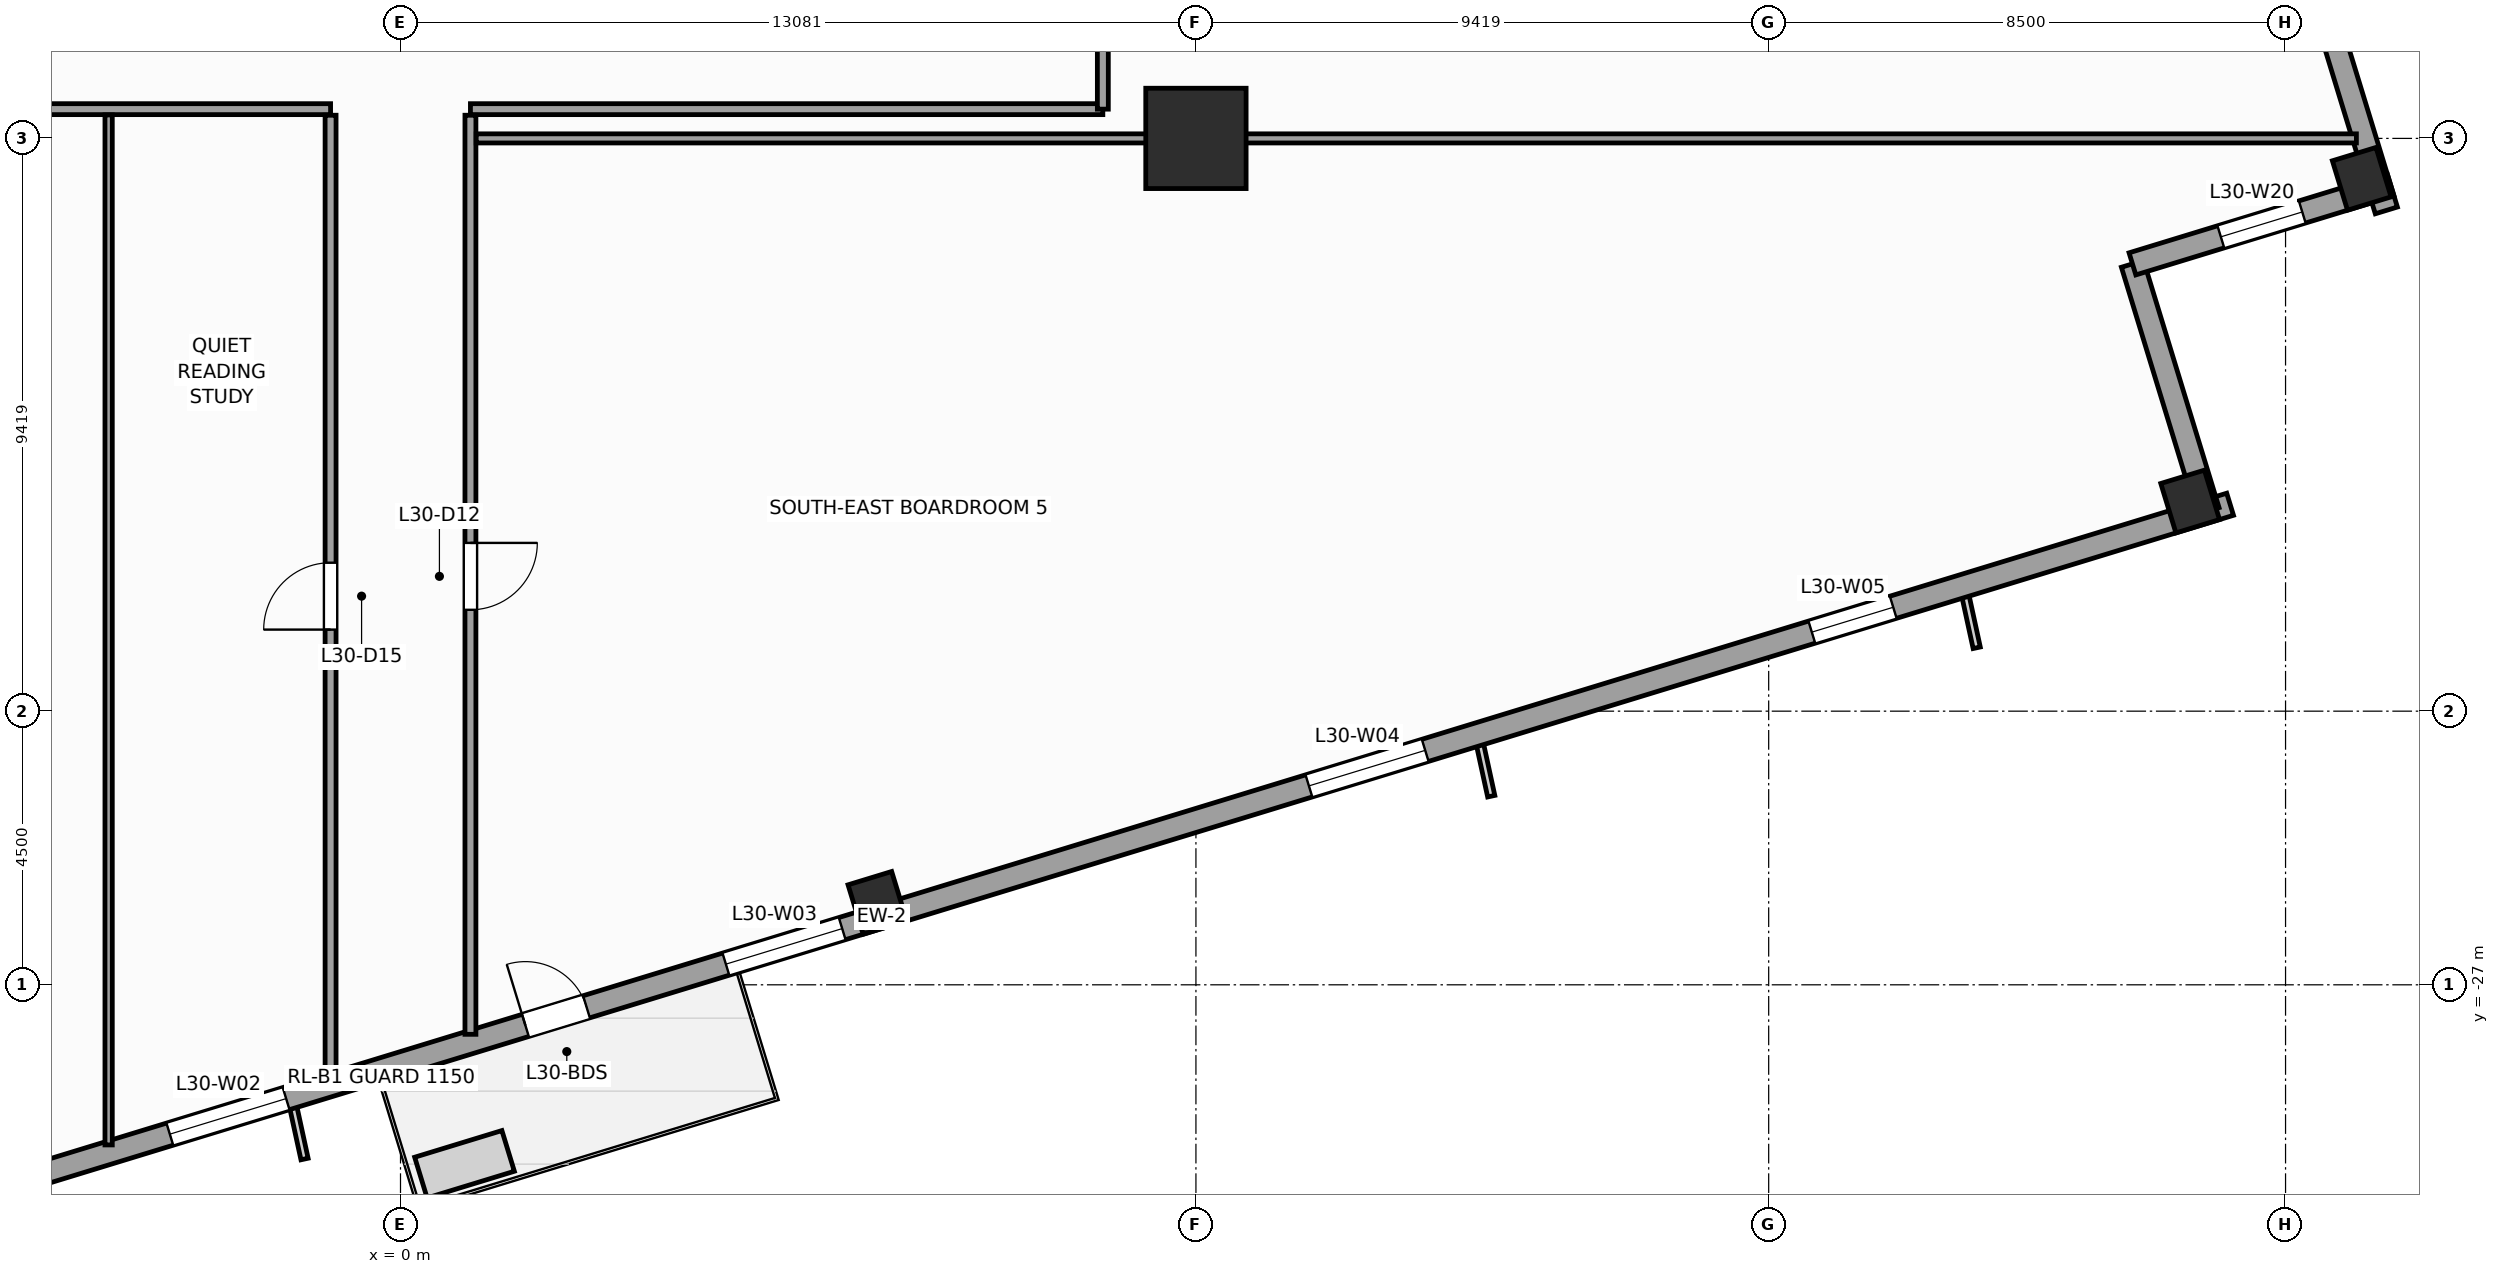
"""IFC4 building model, lengths in metres.
Left out: names, types, materials, properties, quantities, classifications, styles, units other than length and angle.
Written with IfcOpenShell. Run it as: python <this file> out.ifc"""

import sys

from ifc_helpers import new_model, si_unit, direction, frame, frame_2d, origin, origin_2d, place, context, subcontext, project, spatial, rectangle, extrude, source, transform, mapped, element, fill, save


model = new_model("IFC4")
c1 = context("Model", 3, precision=1e-05, world=origin(), true_north=direction((0.0, 1.0)))
c2 = subcontext(c1, "Body", "Model", "MODEL_VIEW")
j1 = project(units=[si_unit("LENGTHUNIT", "METRE"), si_unit("PLANEANGLEUNIT", "RADIAN")], contexts=[c1])
p1 = place(None, origin())
s1 = spatial("IfcSite", under=j1, at=p1, CompositionType="ELEMENT")
p2 = place(p1, origin())
s2 = spatial("IfcBuilding", under=s1, at=p2, CompositionType="ELEMENT")
p3 = place(p2, frame((0.0, 0.0, 127.2)))
s3 = spatial("IfcBuildingStorey", under=s2, at=p3, CompositionType="ELEMENT", Elevation=127.2)
m1 = source(origin(), c2, "Body", "SweptSolid", [
    extrude(rectangle(XDim=1.65, YDim=1.65, at=origin_2d()), origin(), (0.0, 0.0, 1.0), 4.0),
])
p4 = place(p3, frame((13.081, -13.081, 0.0), z_axis=(0.0, 0.0, 1.0), x_axis=(1.0, 0.0, 0.0)))
e1 = element("IfcColumn", 1, at=p4, inside=s3, PredefinedType="COLUMN", context=c2, shape_type="MappedRepresentation", body=[
    mapped(m1, transform((0.0, 0.0, 0.0), scale=1.0)),
])
m2 = source(origin(), c2, "Body", "SweptSolid", [
    extrude(rectangle(XDim=0.75, YDim=0.85, at=origin_2d()), origin(), (0.0, 0.0, 1.0), 4.0),
])
for number, where, z_axis, x_axis in (
    (2, (7.843, -25.653, 0.0), (0.0, 0.0, 1.0), (0.956, 0.292, 0.0)),
    (3, (29.431, -19.052, 0.0), (0.0, 0.0, 1.0), (0.956, 0.292, 0.0)),
    (4, (32.253, -13.746, 0.0), (0.0, 0.0, 1.0), (0.956, 0.292, 0.0)),
):
    element("IfcColumn", number, at=place(p3, frame(where, z_axis=z_axis, x_axis=x_axis)), inside=s3, PredefinedType="COLUMN", context=c2, shape_type="MappedRepresentation", body=[
        mapped(m2, transform((0.0, 0.0, 0.0), scale=1.0)),
    ])
p5 = place(p3, frame((-14.265, -32.658, 0.0), z_axis=(0.0, 0.0, 1.0), x_axis=(0.956304320851, 0.292373127906, 0.0)))
e5 = element("IfcWall", 5, at=p5, inside=s3, PredefinedType="STANDARD", context=c2, shape_type="SweptSolid", body=[
    extrude(rectangle(XDim=46.38, YDim=0.38, at=frame_2d((23.19, 0.0))), origin(), (0.0, 0.0, 1.0), 3.14),
])
p6 = place(p5, frame((17.065, 0.0, 0.0)))
e6 = element("IfcOpeningElement", 6, at=p6, cuts=e5, PredefinedType="OPENING", context=c2, shape_type="SweptSolid", body=[
    extrude(rectangle(XDim=1.05, YDim=2.25, at=frame_2d((0.525, 1.125))), frame((0.0, 0.2, 0.0), z_axis=(0.0, -1.0, 0.0), x_axis=(1.0, 0.0, 0.0)), (0.0, 0.0, 1.0), 0.4),
])
p7 = place(p5, frame((4.865, 0.0, 0.51)))
e7 = element("IfcOpeningElement", 7, at=p7, cuts=e5, PredefinedType="OPENING", context=c2, shape_type="SweptSolid", body=[
    extrude(rectangle(XDim=1.4, YDim=2.4, at=frame_2d((0.7, 1.2))), frame((0.0, 0.2, 0.0), z_axis=(0.0, -1.0, 0.0), x_axis=(1.0, 0.0, 0.0)), (0.0, 0.0, 1.0), 0.4),
])
p8 = place(p5, frame((10.95, 0.0, 0.51)))
e8 = element("IfcOpeningElement", 8, at=p8, cuts=e5, PredefinedType="OPENING", context=c2, shape_type="SweptSolid", body=[
    extrude(rectangle(XDim=2.0, YDim=2.4, at=frame_2d((1.0, 1.2))), frame((0.0, 0.2, 0.0), z_axis=(0.0, -1.0, 0.0), x_axis=(1.0, 0.0, 0.0)), (0.0, 0.0, 1.0), 0.4),
])
p9 = place(p5, frame((20.512, 0.0, 0.51)))
e9 = element("IfcOpeningElement", 9, at=p9, cuts=e5, PredefinedType="OPENING", context=c2, shape_type="SweptSolid", body=[
    extrude(rectangle(XDim=2.0, YDim=2.4, at=frame_2d((1.0, 1.2))), frame((0.0, 0.2, 0.0), z_axis=(0.0, -1.0, 0.0), x_axis=(1.0, 0.0, 0.0)), (0.0, 0.0, 1.0), 0.4),
])
p10 = place(p5, frame((30.538, 0.0, 0.51)))
e10 = element("IfcOpeningElement", 10, at=p10, cuts=e5, PredefinedType="OPENING", context=c2, shape_type="SweptSolid", body=[
    extrude(rectangle(XDim=2.0, YDim=2.4, at=frame_2d((1.0, 1.2))), frame((0.0, 0.2, 0.0), z_axis=(0.0, -1.0, 0.0), x_axis=(1.0, 0.0, 0.0)), (0.0, 0.0, 1.0), 0.4),
])
p11 = place(p5, frame((39.187, 0.0, 0.51)))
e11 = element("IfcOpeningElement", 11, at=p11, cuts=e5, PredefinedType="OPENING", context=c2, shape_type="SweptSolid", body=[
    extrude(rectangle(XDim=1.4, YDim=2.4, at=frame_2d((0.7, 1.2))), frame((0.0, 0.2, 0.0), z_axis=(0.0, -1.0, 0.0), x_axis=(1.0, 0.0, 0.0)), (0.0, 0.0, 1.0), 0.4),
])
p12 = place(p3, frame((29.725, -19.208, 0.0), z_axis=(0.0, 0.0, 1.0), x_axis=(-0.292345507338, 0.956312764915, 0.0)))
e12 = element("IfcWall", 12, at=p12, inside=s3, PredefinedType="STANDARD", context=c2, shape_type="SweptSolid", body=[
    extrude(rectangle(XDim=4.25, YDim=0.38, at=frame_2d((2.125, 0.0))), origin(), (0.0, 0.0, 1.0), 3.74),
])
p13 = place(p3, frame((28.482, -15.144, 0.0), z_axis=(0.0, 0.0, 1.0), x_axis=(0.956304176051, 0.292373601522, 0.0)))
e13 = element("IfcWall", 13, at=p13, inside=s3, PredefinedType="STANDARD", context=c2, shape_type="SweptSolid", body=[
    extrude(rectangle(XDim=4.44, YDim=0.38, at=frame_2d((2.22, 0.0))), origin(), (0.0, 0.0, 1.0), 3.04),
])
p14 = place(p13, frame((1.52, 0.0, 0.51)))
e14 = element("IfcOpeningElement", 14, at=p14, cuts=e13, PredefinedType="OPENING", context=c2, shape_type="SweptSolid", body=[
    extrude(rectangle(XDim=1.4, YDim=2.4, at=frame_2d((0.7, 1.2))), frame((0.0, 0.2, 0.0), z_axis=(0.0, -1.0, 0.0), x_axis=(1.0, 0.0, 0.0)), (0.0, 0.0, 1.0), 0.4),
])
p15 = place(p3, frame((32.658, -14.265, 0.0), z_axis=(0.0, 0.0, 1.0), x_axis=(-0.292373127906, 0.956304320851, 0.0)))
e15 = element("IfcWall", 15, at=p15, inside=s3, PredefinedType="STANDARD", context=c2, shape_type="SweptSolid", body=[
    extrude(rectangle(XDim=46.38, YDim=0.38, at=frame_2d((23.19, 0.0))), origin(), (0.0, 0.0, 1.0), 3.14),
])
p16 = place(p15, frame((4.865, 0.0, 0.51)))
e16 = element("IfcOpeningElement", 16, at=p16, cuts=e15, PredefinedType="OPENING", context=c2, shape_type="SweptSolid", body=[
    extrude(rectangle(XDim=1.4, YDim=2.4, at=frame_2d((0.7, 1.2))), frame((0.0, 0.2, 0.0), z_axis=(0.0, -1.0, 0.0), x_axis=(1.0, 0.0, 0.0)), (0.0, 0.0, 1.0), 0.4),
])
p17 = place(p15, frame((12.45, 0.0, 0.51)))
e17 = element("IfcOpeningElement", 17, at=p17, cuts=e15, PredefinedType="OPENING", context=c2, shape_type="SweptSolid", body=[
    extrude(rectangle(XDim=2.0, YDim=2.4, at=frame_2d((1.0, 1.2))), frame((0.0, 0.2, 0.0), z_axis=(0.0, -1.0, 0.0), x_axis=(1.0, 0.0, 0.0)), (0.0, 0.0, 1.0), 0.4),
])
p18 = place(p15, frame((30.538, 0.0, 0.51)))
e18 = element("IfcOpeningElement", 18, at=p18, cuts=e15, PredefinedType="OPENING", context=c2, shape_type="SweptSolid", body=[
    extrude(rectangle(XDim=2.0, YDim=2.4, at=frame_2d((1.0, 1.2))), frame((0.0, 0.2, 0.0), z_axis=(0.0, -1.0, 0.0), x_axis=(1.0, 0.0, 0.0)), (0.0, 0.0, 1.0), 0.4),
])
p19 = place(p15, frame((39.187, 0.0, 0.51)))
e19 = element("IfcOpeningElement", 19, at=p19, cuts=e15, PredefinedType="OPENING", context=c2, shape_type="SweptSolid", body=[
    extrude(rectangle(XDim=1.4, YDim=2.4, at=frame_2d((0.7, 1.2))), frame((0.0, 0.2, 0.0), z_axis=(0.0, -1.0, 0.0), x_axis=(1.0, 0.0, 0.0)), (0.0, 0.0, 1.0), 0.4),
])
p20 = place(p3, frame((-10.45, -12.6, 0.0), z_axis=(0.0, 0.0, 1.0), x_axis=(1.0, 0.0, 0.0)))
e20 = element("IfcWall", 20, at=p20, inside=s3, PredefinedType="PARTITIONING", context=c2, shape_type="SweptSolid", body=[
    extrude(rectangle(XDim=9.3, YDim=0.18, at=frame_2d((4.65, 0.0))), origin(), (0.0, 0.0, 1.0), 3.74),
])
p21 = place(p3, frame((1.15, -12.6, 0.0), z_axis=(0.0, 0.0, 1.0), x_axis=(1.0, 0.0, 0.0)))
e21 = element("IfcWall", 21, at=p21, inside=s3, PredefinedType="PARTITIONING", context=c2, shape_type="SweptSolid", body=[
    extrude(rectangle(XDim=10.4, YDim=0.18, at=frame_2d((5.2, 0.0))), origin(), (0.0, 0.0, 1.0), 3.74),
])
p22 = place(p3, frame((11.55, -12.6, 0.0), z_axis=(0.0, 0.0, 1.0), x_axis=(0.0, 1.0, 0.0)))
e22 = element("IfcWall", 22, at=p22, inside=s3, PredefinedType="PARTITIONING", context=c2, shape_type="SweptSolid", body=[
    extrude(rectangle(XDim=13.65, YDim=0.18, at=frame_2d((6.825, 0.0))), origin(), (0.0, 0.0, 1.0), 3.74),
])
p23 = place(p22, frame((2.714, 0.0, 0.0)))
e23 = element("IfcOpeningElement", 23, at=p23, cuts=e22, PredefinedType="OPENING", context=c2, shape_type="SweptSolid", body=[
    extrude(rectangle(XDim=1.1, YDim=2.2, at=frame_2d((0.55, 1.1))), frame((0.0, 0.1, 0.0), z_axis=(0.0, -1.0, 0.0), x_axis=(1.0, 0.0, 0.0)), (0.0, 0.0, 1.0), 0.2),
])
p24 = place(p3, frame((-1.15, -28.517, 0.0), z_axis=(0.0, 0.0, 1.0), x_axis=(0.0, 1.0, 0.0)))
e24 = element("IfcWall", 24, at=p24, inside=s3, PredefinedType="PARTITIONING", context=c2, shape_type="SweptSolid", body=[
    extrude(rectangle(XDim=15.817, YDim=0.18, at=frame_2d((7.909, 0.0))), origin(), (0.0, 0.0, 1.0), 3.74),
])
p25 = place(p24, frame((7.359, 0.0, 0.0)))
e25 = element("IfcOpeningElement", 25, at=p25, cuts=e24, PredefinedType="OPENING", context=c2, shape_type="SweptSolid", body=[
    extrude(rectangle(XDim=1.1, YDim=2.2, at=frame_2d((0.55, 1.1))), frame((0.0, 0.1, 0.0), z_axis=(0.0, -1.0, 0.0), x_axis=(1.0, 0.0, 0.0)), (0.0, 0.0, 1.0), 0.2),
])
p26 = place(p3, frame((1.15, -27.814, 0.0), z_axis=(0.0, 0.0, 1.0), x_axis=(0.0, 1.0, 0.0)))
e26 = element("IfcWall", 26, at=p26, inside=s3, PredefinedType="PARTITIONING", context=c2, shape_type="SweptSolid", body=[
    extrude(rectangle(XDim=15.114, YDim=0.18, at=frame_2d((7.557, 0.0))), origin(), (0.0, 0.0, 1.0), 3.74),
])
p27 = place(p26, frame((6.981, 0.0, 0.0)))
e27 = element("IfcOpeningElement", 27, at=p27, cuts=e26, PredefinedType="OPENING", context=c2, shape_type="SweptSolid", body=[
    extrude(rectangle(XDim=1.1, YDim=2.2, at=frame_2d((0.55, 1.1))), frame((0.0, 0.1, 0.0), z_axis=(0.0, -1.0, 0.0), x_axis=(1.0, 0.0, 0.0)), (0.0, 0.0, 1.0), 0.2),
])
p28 = place(p3, frame((1.245, -13.081, 0.0), z_axis=(0.0, 0.0, 1.0), x_axis=(1.0, 0.0, 0.0)))
e28 = element("IfcWall", 28, at=p28, inside=s3, PredefinedType="PARTITIONING", context=c2, shape_type="SweptSolid", body=[
    extrude(rectangle(XDim=30.92, YDim=0.15, at=frame_2d((15.46, 0.0))), origin(), (0.0, 0.0, 1.0), 2.732),
])
p29 = place(p3, frame((-4.8, -29.633, 0.0), z_axis=(0.0, 0.0, 1.0), x_axis=(0.0, 1.0, 0.0)))
e29 = element("IfcWall", 29, at=p29, inside=s3, PredefinedType="PARTITIONING", context=c2, shape_type="SweptSolid", body=[
    extrude(rectangle(XDim=16.938, YDim=0.12, at=frame_2d((8.469, 0.0))), origin(), (0.0, 0.0, 1.0), 3.74),
])
m3 = source(origin(), c2, "Body", "SweptSolid", [
    extrude(rectangle(XDim=1.05, YDim=2.25, at=frame_2d((0.525, 1.125))), frame((0.0, 0.025, 0.0), z_axis=(0.0, -1.0, 0.0), x_axis=(1.0, 0.0, 0.0)), (0.0, 0.0, 1.0), 0.05),
])
p30 = place(p6, origin())
e30 = element("IfcDoor", 30, at=p30, inside=s3, OperationType="SINGLE_SWING_LEFT", PredefinedType="DOOR", context=c2, shape_type="MappedRepresentation", body=[
    mapped(m3, transform((0.0, 0.0, 0.0), scale=1.0)),
])
fill(e6, e30)
m4 = source(origin(), c2, "Body", "SweptSolid", [
    extrude(rectangle(XDim=2.0, YDim=2.4, at=frame_2d((1.0, 1.2))), frame((0.0, 0.03, 0.0), z_axis=(0.0, -1.0, 0.0), x_axis=(1.0, 0.0, 0.0)), (0.0, 0.0, 1.0), 0.06),
])
p31 = place(p8, origin())
e31 = element("IfcWindow", 31, at=p31, inside=s3, PartitioningType="SINGLE_PANEL", PredefinedType="WINDOW", context=c2, shape_type="MappedRepresentation", body=[
    mapped(m4, transform((0.0, 0.0, 0.0), scale=1.0)),
])
fill(e8, e31)
p32 = place(p9, origin())
e32 = element("IfcWindow", 32, at=p32, inside=s3, PartitioningType="SINGLE_PANEL", PredefinedType="WINDOW", context=c2, shape_type="MappedRepresentation", body=[
    mapped(m4, transform((0.0, 0.0, 0.0), scale=1.0)),
])
fill(e9, e32)
p33 = place(p10, origin())
e33 = element("IfcWindow", 33, at=p33, inside=s3, PartitioningType="SINGLE_PANEL", PredefinedType="WINDOW", context=c2, shape_type="MappedRepresentation", body=[
    mapped(m4, transform((0.0, 0.0, 0.0), scale=1.0)),
])
fill(e10, e33)
m5 = source(origin(), c2, "Body", "SweptSolid", [
    extrude(rectangle(XDim=1.4, YDim=2.4, at=frame_2d((0.7, 1.2))), frame((0.0, 0.03, 0.0), z_axis=(0.0, -1.0, 0.0), x_axis=(1.0, 0.0, 0.0)), (0.0, 0.0, 1.0), 0.06),
])
p34 = place(p11, origin())
e34 = element("IfcWindow", 34, at=p34, inside=s3, PartitioningType="SINGLE_PANEL", PredefinedType="WINDOW", context=c2, shape_type="MappedRepresentation", body=[
    mapped(m5, transform((0.0, 0.0, 0.0), scale=1.0)),
])
fill(e11, e34)
p35 = place(p14, origin())
e35 = element("IfcWindow", 35, at=p35, inside=s3, PartitioningType="SINGLE_PANEL", PredefinedType="WINDOW", context=c2, shape_type="MappedRepresentation", body=[
    mapped(m5, transform((0.0, 0.0, 0.0), scale=1.0)),
])
fill(e14, e35)
m6 = source(origin(), c2, "Body", "SweptSolid", [
    extrude(rectangle(XDim=1.1, YDim=2.2, at=frame_2d((0.55, 1.1))), frame((0.0, 0.025, 0.0), z_axis=(0.0, -1.0, 0.0), x_axis=(1.0, 0.0, 0.0)), (0.0, 0.0, 1.0), 0.05),
])
p36 = place(p27, frame((1.1, 0.0, 0.0), z_axis=(0.0, 0.0, 1.0), x_axis=(-1.0, 0.0, 0.0)))
e36 = element("IfcDoor", 36, at=p36, inside=s3, OperationType="SINGLE_SWING_RIGHT", PredefinedType="DOOR", context=c2, shape_type="MappedRepresentation", body=[
    mapped(m6, transform((0.0, 0.0, 0.0), scale=1.0)),
])
fill(e27, e36)
p37 = place(p25, origin())
e37 = element("IfcDoor", 37, at=p37, inside=s3, OperationType="SINGLE_SWING_LEFT", PredefinedType="DOOR", context=c2, shape_type="MappedRepresentation", body=[
    mapped(m6, transform((0.0, 0.0, 0.0), scale=1.0)),
])
fill(e25, e37)
save(model, sys.argv[1])
